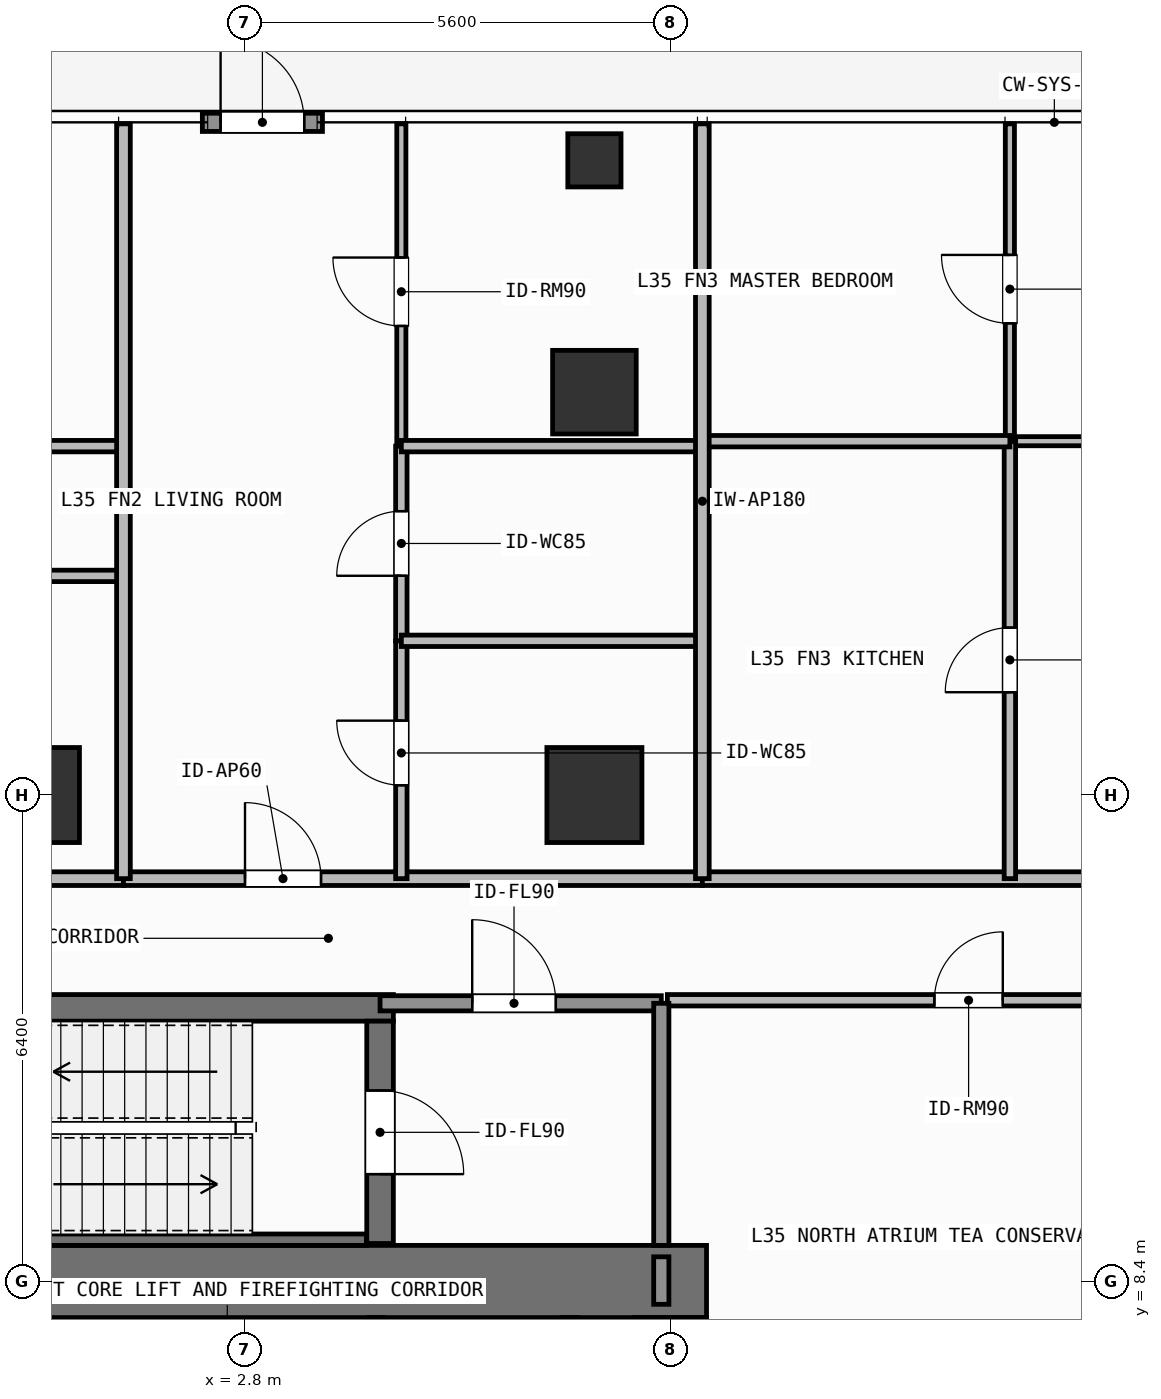
"""IFC4 building model, lengths in metres.
Left out: names, types, materials, properties, quantities, classifications, styles, units other than length and angle.
Written with IfcOpenShell. Run it as: python <this file> out.ifc"""

import sys

from ifc_helpers import new_model, si_unit, direction, frame, frame_2d, origin, origin_2d, place, context, subcontext, project, spatial, rectangle, hollow_rectangle, extrude, element, fill, save


model = new_model("IFC4")
c1 = context("Model", 3, precision=1e-05, world=origin(), true_north=direction((0.0, 1.0)))
c2 = subcontext(c1, "Body", "Model", "MODEL_VIEW")
j1 = project(units=[si_unit("LENGTHUNIT", "METRE"), si_unit("PLANEANGLEUNIT", "RADIAN")], contexts=[c1])
p1 = place(None, origin())
s1 = spatial("IfcSite", under=j1, at=p1, CompositionType="ELEMENT")
p2 = place(p1, origin())
s2 = spatial("IfcBuilding", under=s1, at=p2, CompositionType="ELEMENT")
p3 = place(p2, frame((0.0, 0.0, 140.7)))
s3 = spatial("IfcBuildingStorey", under=s2, at=p3, CompositionType="ELEMENT", Elevation=140.7)
p4 = place(p3, frame((-7.55, 8.4, 0.0), z_axis=(0.0, 0.0, 1.0), x_axis=(1.0, 0.0, 0.0)))
e1 = element("IfcWall", 1, at=p4, inside=s3, PredefinedType="SHEAR", context=c2, shape_type="SweptSolid", body=[
    extrude(rectangle(XDim=16.425, YDim=0.95, at=frame_2d((8.212, 0.0))), origin(), (0.0, 0.0, 1.0), 3.9),
])
p5 = place(p3, frame((8.4, 5.825, 0.0), z_axis=(0.0, 0.0, 1.0), x_axis=(0.0, 1.0, 0.0)))
e2 = element("IfcWall", 2, at=p5, inside=s3, PredefinedType="SHEAR", context=c2, shape_type="SweptSolid", body=[
    extrude(rectangle(XDim=2.1, YDim=0.95, at=frame_2d((1.05, 0.0))), origin(), (0.0, 0.0, 1.0), 3.9),
])
p6 = place(p3, frame((-2.555, 12.0, 0.0), z_axis=(0.0, 0.0, 1.0), x_axis=(1.0, 0.0, 0.0)))
e3 = element("IfcWall", 3, at=p6, inside=s3, PredefinedType="SHEAR", context=c2, shape_type="SweptSolid", body=[
    extrude(rectangle(XDim=7.31, YDim=0.35, at=frame_2d((3.655, 0.0))), origin(), (0.0, 0.0, 1.0), 3.9),
])
p7 = place(p3, frame((-2.2, 8.95, 0.0), z_axis=(0.0, 0.0, 1.0), x_axis=(1.0, 0.0, 0.0)))
e4 = element("IfcWall", 4, at=p7, inside=s3, PredefinedType="SHEAR", context=c2, shape_type="SweptSolid", body=[
    extrude(rectangle(XDim=6.6, YDim=0.15, at=frame_2d((3.3, 0.0))), origin(), (0.0, 0.0, 1.0), 3.9),
])
p8 = place(p3, frame((4.58, 11.825, 0.0), z_axis=(0.0, 0.0, 1.0), x_axis=(0.0, -1.0, 0.0)))
e5 = element("IfcWall", 5, at=p8, inside=s3, PredefinedType="SHEAR", context=c2, shape_type="SweptSolid", body=[
    extrude(rectangle(XDim=2.925, YDim=0.35, at=frame_2d((1.462, 0.0))), origin(), (0.0, 0.0, 1.0), 3.9),
])
p9 = place(p8, frame((0.913, 0.0, 0.0)))
e6 = element("IfcOpeningElement", 6, at=p9, cuts=e5, PredefinedType="OPENING", context=c2, shape_type="SweptSolid", body=[
    extrude(rectangle(XDim=1.1, YDim=2.15, at=frame_2d((0.55, 1.075))), frame((0.0, 0.185, 0.0), z_axis=(0.0, -1.0, 0.0), x_axis=(1.0, 0.0, 0.0)), (0.0, 0.0, 1.0), 0.37),
])
for number, where, z_axis, x_axis in (
    (7, (0.0, 14.8, 0.0), (0.0, 0.0, 1.0), (1.0, 0.0, 0.0)),
    (8, (7.4, 14.8, 0.0), (0.0, 0.0, 1.0), (1.0, 0.0, 0.0)),
):
    element("IfcColumn", number, at=place(p3, frame(where, z_axis=z_axis, x_axis=x_axis)), inside=s3, PredefinedType="COLUMN", context=c2, shape_type="SweptSolid", body=[
        extrude(rectangle(XDim=1.25, YDim=1.25, at=origin_2d()), origin(), (0.0, 0.0, 1.0), 3.9),
    ])
p10 = place(p3, frame((7.4, 20.1, 0.0), z_axis=(0.0, 0.0, 1.0), x_axis=(1.0, 0.0, 0.0)))
e9 = element("IfcColumn", 9, at=p10, inside=s3, PredefinedType="COLUMN", context=c2, shape_type="SweptSolid", body=[
    extrude(rectangle(XDim=1.1, YDim=1.1, at=origin_2d()), origin(), (0.0, 0.0, 1.0), 3.9),
])
p11 = place(p3, frame((7.4, 23.15, 0.0), z_axis=(0.0, 0.0, 1.0), x_axis=(1.0, 0.0, 0.0)))
e10 = element("IfcColumn", 10, at=p11, inside=s3, PredefinedType="COLUMN", context=c2, shape_type="SweptSolid", body=[
    extrude(hollow_rectangle(XDim=0.7, YDim=0.7, WallThickness=0.032, at=origin_2d()), origin(), (0.0, 0.0, 1.0), 3.9),
])
p12 = place(p3, frame((2.242, 23.65, 0.0), z_axis=(0.0, 0.0, 1.0), x_axis=(1.0, 0.0, 0.0)))
e11 = element("IfcWall", 11, at=p12, inside=s3, PredefinedType="SOLIDWALL", context=c2, shape_type="SweptSolid", body=[
    extrude(rectangle(XDim=1.58, YDim=0.24, at=frame_2d((0.79, 0.0))), origin(), (0.0, 0.0, 1.0), 3.68),
])
p13 = place(p12, frame((0.24, 0.0, 0.0)))
e12 = element("IfcOpeningElement", 12, at=p13, cuts=e11, PredefinedType="OPENING", context=c2, shape_type="SweptSolid", body=[
    extrude(rectangle(XDim=1.1, YDim=2.2, at=frame_2d((0.55, 1.1))), frame((0.0, 0.13, 0.0), z_axis=(0.0, -1.0, 0.0), x_axis=(1.0, 0.0, 0.0)), (0.0, 0.0, 1.0), 0.26),
])
p14 = place(p3, frame((4.525, 5.825, 0.0), z_axis=(0.0, 0.0, 1.0), x_axis=(0.0, 1.0, 0.0)))
e13 = element("IfcWall", 13, at=p14, inside=s3, PredefinedType="SHEAR", context=c2, shape_type="SweptSolid", body=[
    extrude(rectangle(XDim=2.1, YDim=0.2, at=frame_2d((1.05, 0.0))), origin(), (0.0, 0.0, 1.0), 3.68),
])
p15 = place(p14, frame((0.425, 0.0, 0.0)))
e14 = element("IfcOpeningElement", 14, at=p15, cuts=e13, PredefinedType="OPENING", context=c2, shape_type="SweptSolid", body=[
    extrude(rectangle(XDim=1.1, YDim=2.2, at=frame_2d((0.55, 1.1))), frame((0.0, 0.11, 0.0), z_axis=(0.0, -1.0, 0.0), x_axis=(1.0, 0.0, 0.0)), (0.0, 0.0, 1.0), 0.22),
])
p16 = place(p3, frame((7.075, 5.825, 0.0), z_axis=(0.0, 0.0, 1.0), x_axis=(0.0, 1.0, 0.0)))
e15 = element("IfcWall", 15, at=p16, inside=s3, PredefinedType="SHEAR", context=c2, shape_type="SweptSolid", body=[
    extrude(rectangle(XDim=2.1, YDim=0.2, at=frame_2d((1.05, 0.0))), origin(), (0.0, 0.0, 1.0), 3.68),
])
p17 = place(p3, frame((4.58, 12.06, 0.0), z_axis=(0.0, 0.0, 1.0), x_axis=(1.0, 0.0, 0.0)))
e16 = element("IfcWall", 16, at=p17, inside=s3, PredefinedType="SOLIDWALL", context=c2, shape_type="SweptSolid", body=[
    extrude(rectangle(XDim=3.7, YDim=0.2, at=frame_2d((1.85, 0.0))), origin(), (0.0, 0.0, 1.0), 3.68),
])
p18 = place(p17, frame((1.212, 0.0, 0.0)))
e17 = element("IfcOpeningElement", 17, at=p18, cuts=e16, PredefinedType="OPENING", context=c2, shape_type="SweptSolid", body=[
    extrude(rectangle(XDim=1.1, YDim=2.15, at=frame_2d((0.55, 1.075))), frame((0.0, 0.11, 0.0), z_axis=(0.0, -1.0, 0.0), x_axis=(1.0, 0.0, 0.0)), (0.0, 0.0, 1.0), 0.22),
])
p19 = place(p3, frame((8.36, 12.1, 0.0), z_axis=(0.0, 0.0, 1.0), x_axis=(1.0, 0.0, 0.0)))
e18 = element("IfcWall", 18, at=p19, inside=s3, PredefinedType="PARTITIONING", context=c2, shape_type="SweptSolid", body=[
    extrude(rectangle(XDim=7.22, YDim=0.15, at=frame_2d((3.61, 0.0))), origin(), (0.0, 0.0, 1.0), 3.68),
])
p20 = place(p19, frame((3.513, 0.0, 0.0)))
e19 = element("IfcOpeningElement", 19, at=p20, cuts=e18, PredefinedType="OPENING", context=c2, shape_type="SweptSolid", body=[
    extrude(rectangle(XDim=0.9, YDim=2.1, at=frame_2d((0.45, 1.05))), frame((0.0, 0.085, 0.0), z_axis=(0.0, -1.0, 0.0), x_axis=(1.0, 0.0, 0.0)), (0.0, 0.0, 1.0), 0.17),
])
p21 = place(p3, frame((-16.32, 13.7, 0.0), z_axis=(0.0, 0.0, 1.0), x_axis=(1.0, 0.0, 0.0)))
e20 = element("IfcWall", 20, at=p21, inside=s3, PredefinedType="PARTITIONING", context=c2, shape_type="SweptSolid", body=[
    extrude(rectangle(XDim=17.524, YDim=0.18, at=frame_2d((8.762, 0.0))), origin(), (0.0, 0.0, 1.0), 3.68),
])
p22 = place(p21, frame((7.104, 0.0, 0.0)))
e21 = element("IfcOpeningElement", 21, at=p22, cuts=e20, PredefinedType="OPENING", context=c2, shape_type="SweptSolid", body=[
    extrude(rectangle(XDim=1.0, YDim=2.2, at=frame_2d((0.5, 1.1))), frame((0.0, 0.1, 0.0), z_axis=(0.0, -1.0, 0.0), x_axis=(1.0, 0.0, 0.0)), (0.0, 0.0, 1.0), 0.2),
])
p23 = place(p3, frame((1.204, 13.7, 0.0), z_axis=(0.0, 0.0, 1.0), x_axis=(1.0, 0.0, 0.0)))
e22 = element("IfcWall", 22, at=p23, inside=s3, PredefinedType="PARTITIONING", context=c2, shape_type="SweptSolid", body=[
    extrude(rectangle(XDim=7.616, YDim=0.18, at=frame_2d((3.808, 0.0))), origin(), (0.0, 0.0, 1.0), 3.68),
])
p24 = place(p23, frame((1.599, 0.0, 0.0)))
e23 = element("IfcOpeningElement", 23, at=p24, cuts=e22, PredefinedType="OPENING", context=c2, shape_type="SweptSolid", body=[
    extrude(rectangle(XDim=1.0, YDim=2.2, at=frame_2d((0.5, 1.1))), frame((0.0, 0.1, 0.0), z_axis=(0.0, -1.0, 0.0), x_axis=(1.0, 0.0, 0.0)), (0.0, 0.0, 1.0), 0.2),
])
p25 = place(p3, frame((4.86, 13.7, 0.0), z_axis=(0.0, 0.0, 1.0), x_axis=(0.0, 1.0, 0.0)))
e24 = element("IfcWall", 24, at=p25, inside=s3, PredefinedType="PARTITIONING", context=c2, shape_type="SweptSolid", body=[
    extrude(rectangle(XDim=3.129, YDim=0.15, at=frame_2d((1.564, 0.0))), origin(), (0.0, 0.0, 1.0), 3.68),
])
p26 = place(p25, frame((1.229, 0.0, 0.0)))
e25 = element("IfcOpeningElement", 25, at=p26, cuts=e24, PredefinedType="OPENING", context=c2, shape_type="SweptSolid", body=[
    extrude(rectangle(XDim=0.85, YDim=2.1, at=frame_2d((0.425, 1.05))), frame((0.0, 0.085, 0.0), z_axis=(0.0, -1.0, 0.0), x_axis=(1.0, 0.0, 0.0)), (0.0, 0.0, 1.0), 0.17),
])
p27 = place(p3, frame((4.86, 16.829, 0.0), z_axis=(0.0, 0.0, 1.0), x_axis=(0.0, 1.0, 0.0)))
e26 = element("IfcWall", 26, at=p27, inside=s3, PredefinedType="PARTITIONING", context=c2, shape_type="SweptSolid", body=[
    extrude(rectangle(XDim=2.561, YDim=0.15, at=frame_2d((1.28, 0.0))), origin(), (0.0, 0.0, 1.0), 3.68),
])
p28 = place(p27, frame((0.855, 0.0, 0.0)))
e27 = element("IfcOpeningElement", 27, at=p28, cuts=e26, PredefinedType="OPENING", context=c2, shape_type="SweptSolid", body=[
    extrude(rectangle(XDim=0.85, YDim=2.1, at=frame_2d((0.425, 1.05))), frame((0.0, 0.085, 0.0), z_axis=(0.0, -1.0, 0.0), x_axis=(1.0, 0.0, 0.0)), (0.0, 0.0, 1.0), 0.17),
])
p29 = place(p3, frame((4.86, 19.39, 0.0), z_axis=(0.0, 0.0, 1.0), x_axis=(0.0, 1.0, 0.0)))
e28 = element("IfcWall", 28, at=p29, inside=s3, PredefinedType="PARTITIONING", context=c2, shape_type="SweptSolid", body=[
    extrude(rectangle(XDim=4.24, YDim=0.12, at=frame_2d((2.12, 0.0))), origin(), (0.0, 0.0, 1.0), 3.68),
])
p30 = place(p29, frame((1.581, 0.0, 0.0)))
e29 = element("IfcOpeningElement", 29, at=p30, cuts=e28, PredefinedType="OPENING", context=c2, shape_type="SweptSolid", body=[
    extrude(rectangle(XDim=0.9, YDim=2.1, at=frame_2d((0.45, 1.05))), frame((0.0, 0.07, 0.0), z_axis=(0.0, -1.0, 0.0), x_axis=(1.0, 0.0, 0.0)), (0.0, 0.0, 1.0), 0.14),
])
p31 = place(p3, frame((8.82, 13.7, 0.0), z_axis=(0.0, 0.0, 1.0), x_axis=(1.0, 0.0, 0.0)))
e30 = element("IfcWall", 30, at=p31, inside=s3, PredefinedType="PARTITIONING", context=c2, shape_type="SweptSolid", body=[
    extrude(rectangle(XDim=15.3, YDim=0.18, at=frame_2d((7.65, 0.0))), origin(), (0.0, 0.0, 1.0), 3.68),
])
p32 = place(p31, frame((7.688, 0.0, 0.0)))
e31 = element("IfcOpeningElement", 31, at=p32, cuts=e30, PredefinedType="OPENING", context=c2, shape_type="SweptSolid", body=[
    extrude(rectangle(XDim=1.0, YDim=2.2, at=frame_2d((0.5, 1.1))), frame((0.0, 0.1, 0.0), z_axis=(0.0, -1.0, 0.0), x_axis=(1.0, 0.0, 0.0)), (0.0, 0.0, 1.0), 0.2),
])
p33 = place(p3, frame((12.866, 19.455, 0.0), z_axis=(0.0, 0.0, 1.0), x_axis=(1.0, 0.0, 0.0)))
e32 = element("IfcWall", 32, at=p33, inside=s3, PredefinedType="PARTITIONING", context=c2, shape_type="SweptSolid", body=[
    extrude(rectangle(XDim=8.404, YDim=0.12, at=frame_2d((4.202, 0.0))), origin(), (0.0, 0.0, 1.0), 3.68),
])
p34 = place(p33, frame((3.752, 0.0, 0.0)))
e33 = element("IfcOpeningElement", 33, at=p34, cuts=e32, PredefinedType="OPENING", context=c2, shape_type="SweptSolid", body=[
    extrude(rectangle(XDim=0.9, YDim=2.1, at=frame_2d((0.45, 1.05))), frame((0.0, 0.07, 0.0), z_axis=(0.0, -1.0, 0.0), x_axis=(1.0, 0.0, 0.0)), (0.0, 0.0, 1.0), 0.14),
])
p35 = place(p3, frame((12.866, 13.7, 0.0), z_axis=(0.0, 0.0, 1.0), x_axis=(0.0, 1.0, 0.0)))
e34 = element("IfcWall", 34, at=p35, inside=s3, PredefinedType="PARTITIONING", context=c2, shape_type="SweptSolid", body=[
    extrude(rectangle(XDim=5.755, YDim=0.15, at=frame_2d((2.877, 0.0))), origin(), (0.0, 0.0, 1.0), 3.68),
])
p36 = place(p35, frame((2.452, 0.0, 0.0)))
e35 = element("IfcOpeningElement", 35, at=p36, cuts=e34, PredefinedType="OPENING", context=c2, shape_type="SweptSolid", body=[
    extrude(rectangle(XDim=0.85, YDim=2.1, at=frame_2d((0.425, 1.05))), frame((0.0, 0.085, 0.0), z_axis=(0.0, -1.0, 0.0), x_axis=(1.0, 0.0, 0.0)), (0.0, 0.0, 1.0), 0.17),
])
p37 = place(p3, frame((12.866, 19.455, 0.0), z_axis=(0.0, 0.0, 1.0), x_axis=(0.0, 1.0, 0.0)))
e36 = element("IfcWall", 36, at=p37, inside=s3, PredefinedType="PARTITIONING", context=c2, shape_type="SweptSolid", body=[
    extrude(rectangle(XDim=4.175, YDim=0.12, at=frame_2d((2.087, 0.0))), origin(), (0.0, 0.0, 1.0), 3.68),
])
p38 = place(p37, frame((1.551, 0.0, 0.0)))
e37 = element("IfcOpeningElement", 37, at=p38, cuts=e36, PredefinedType="OPENING", context=c2, shape_type="SweptSolid", body=[
    extrude(rectangle(XDim=0.9, YDim=2.1, at=frame_2d((0.45, 1.05))), frame((0.0, 0.07, 0.0), z_axis=(0.0, -1.0, 0.0), x_axis=(1.0, 0.0, 0.0)), (0.0, 0.0, 1.0), 0.14),
])
p39 = place(p3, frame((8.28, 8.875, 0.0), z_axis=(0.0, 0.0, 1.0), x_axis=(0.0, 1.0, 0.0)))
e38 = element("IfcWall", 38, at=p39, inside=s3, PredefinedType="SOLIDWALL", context=c2, shape_type="SweptSolid", body=[
    extrude(rectangle(XDim=3.185, YDim=0.2, at=frame_2d((1.593, 0.0))), origin(), (0.0, 0.0, 1.0), 3.68),
])
p40 = place(p3, frame((8.28, 8.1, 0.0), z_axis=(0.0, 0.0, 1.0), x_axis=(0.0, 1.0, 0.0)))
e39 = element("IfcWall", 39, at=p40, inside=s3, PredefinedType="SOLIDWALL", context=c2, shape_type="SweptSolid", body=[
    extrude(rectangle(XDim=0.625, YDim=0.2, at=frame_2d((0.312, 0.0))), origin(), (0.0, 0.0, 1.0), 3.68),
])
for number, where, z_axis, x_axis in (
    (40, (-4.89, 17.683, 0.0), (0.0, 0.0, 1.0), (1.0, 0.0, 0.0)),
    (41, (-4.89, 19.39, 0.0), (0.0, 0.0, 1.0), (1.0, 0.0, 0.0)),
):
    element("IfcWall", number, at=place(p3, frame(where, z_axis=z_axis, x_axis=x_axis)), inside=s3, PredefinedType="PARTITIONING", context=c2, shape_type="SweptSolid", body=[
        extrude(rectangle(XDim=6.094, YDim=0.15, at=frame_2d((3.047, 0.0))), origin(), (0.0, 0.0, 1.0), 3.68),
    ])
for number, where, z_axis, x_axis in (
    (42, (4.86, 16.829, 0.0), (0.0, 0.0, 1.0), (1.0, 0.0, 0.0)),
    (43, (4.86, 19.39, 0.0), (0.0, 0.0, 1.0), (1.0, 0.0, 0.0)),
):
    element("IfcWall", number, at=place(p3, frame(where, z_axis=z_axis, x_axis=x_axis)), inside=s3, PredefinedType="PARTITIONING", context=c2, shape_type="SweptSolid", body=[
        extrude(rectangle(XDim=3.96, YDim=0.15, at=frame_2d((1.98, 0.0))), origin(), (0.0, 0.0, 1.0), 3.68),
    ])
p41 = place(p3, frame((1.204, 13.7, 0.0), z_axis=(0.0, 0.0, 1.0), x_axis=(0.0, 1.0, 0.0)))
e44 = element("IfcWall", 44, at=p41, inside=s3, PredefinedType="PARTITIONING", context=c2, shape_type="SweptSolid", body=[
    extrude(rectangle(XDim=9.93, YDim=0.18, at=frame_2d((4.965, 0.0))), origin(), (0.0, 0.0, 1.0), 3.68),
])
p42 = place(p3, frame((8.82, 19.455, 0.0), z_axis=(0.0, 0.0, 1.0), x_axis=(1.0, 0.0, 0.0)))
e45 = element("IfcWall", 45, at=p42, inside=s3, PredefinedType="PARTITIONING", context=c2, shape_type="SweptSolid", body=[
    extrude(rectangle(XDim=4.046, YDim=0.15, at=frame_2d((2.023, 0.0))), origin(), (0.0, 0.0, 1.0), 3.68),
])
p43 = place(p3, frame((8.82, 13.7, 0.0), z_axis=(0.0, 0.0, 1.0), x_axis=(0.0, 1.0, 0.0)))
e46 = element("IfcWall", 46, at=p43, inside=s3, PredefinedType="PARTITIONING", context=c2, shape_type="SweptSolid", body=[
    extrude(rectangle(XDim=9.93, YDim=0.18, at=frame_2d((4.965, 0.0))), origin(), (0.0, 0.0, 1.0), 3.68),
])
p44 = place(p13, origin())
e47 = element("IfcDoor", 47, at=p44, inside=s3, OperationType="SINGLE_SWING_LEFT", PredefinedType="DOOR", context=c2, shape_type="SweptSolid", body=[
    extrude(rectangle(XDim=1.1, YDim=2.2, at=frame_2d((0.55, 1.1))), frame((0.0, 0.025, 0.0), z_axis=(0.0, -1.0, 0.0), x_axis=(1.0, 0.0, 0.0)), (0.0, 0.0, 1.0), 0.05),
])
fill(e12, e47)
p45 = place(p9, origin())
e48 = element("IfcDoor", 48, at=p45, inside=s3, OperationType="SINGLE_SWING_RIGHT", PredefinedType="DOOR", context=c2, shape_type="SweptSolid", body=[
    extrude(rectangle(XDim=1.1, YDim=2.15, at=frame_2d((0.55, 1.075))), frame((0.0, 0.025, 0.0), z_axis=(0.0, -1.0, 0.0), x_axis=(1.0, 0.0, 0.0)), (0.0, 0.0, 1.0), 0.05),
])
fill(e6, e48)
p46 = place(p18, origin())
e49 = element("IfcDoor", 49, at=p46, inside=s3, OperationType="SINGLE_SWING_LEFT", PredefinedType="DOOR", context=c2, shape_type="SweptSolid", body=[
    extrude(rectangle(XDim=1.1, YDim=2.15, at=frame_2d((0.55, 1.075))), frame((0.0, 0.025, 0.0), z_axis=(0.0, -1.0, 0.0), x_axis=(1.0, 0.0, 0.0)), (0.0, 0.0, 1.0), 0.05),
])
fill(e17, e49)
p47 = place(p20, origin())
e50 = element("IfcDoor", 50, at=p47, inside=s3, OperationType="SINGLE_SWING_RIGHT", PredefinedType="DOOR", context=c2, shape_type="SweptSolid", body=[
    extrude(rectangle(XDim=0.9, YDim=2.1, at=frame_2d((0.45, 1.05))), frame((0.0, 0.025, 0.0), z_axis=(0.0, -1.0, 0.0), x_axis=(1.0, 0.0, 0.0)), (0.0, 0.0, 1.0), 0.05),
])
fill(e19, e50)
p48 = place(p24, origin())
e51 = element("IfcDoor", 51, at=p48, inside=s3, OperationType="SINGLE_SWING_LEFT", PredefinedType="DOOR", context=c2, shape_type="SweptSolid", body=[
    extrude(rectangle(XDim=1.0, YDim=2.2, at=frame_2d((0.5, 1.1))), frame((0.0, 0.025, 0.0), z_axis=(0.0, -1.0, 0.0), x_axis=(1.0, 0.0, 0.0)), (0.0, 0.0, 1.0), 0.05),
])
fill(e23, e51)
p49 = place(p26, origin())
e52 = element("IfcDoor", 52, at=p49, inside=s3, OperationType="SINGLE_SWING_RIGHT", PredefinedType="DOOR", context=c2, shape_type="SweptSolid", body=[
    extrude(rectangle(XDim=0.85, YDim=2.1, at=frame_2d((0.425, 1.05))), frame((0.0, 0.025, 0.0), z_axis=(0.0, -1.0, 0.0), x_axis=(1.0, 0.0, 0.0)), (0.0, 0.0, 1.0), 0.05),
])
fill(e25, e52)
p50 = place(p28, origin())
e53 = element("IfcDoor", 53, at=p50, inside=s3, OperationType="SINGLE_SWING_LEFT", PredefinedType="DOOR", context=c2, shape_type="SweptSolid", body=[
    extrude(rectangle(XDim=0.85, YDim=2.1, at=frame_2d((0.425, 1.05))), frame((0.0, 0.025, 0.0), z_axis=(0.0, -1.0, 0.0), x_axis=(1.0, 0.0, 0.0)), (0.0, 0.0, 1.0), 0.05),
])
fill(e27, e53)
p51 = place(p30, origin())
e54 = element("IfcDoor", 54, at=p51, inside=s3, OperationType="SINGLE_SWING_RIGHT", PredefinedType="DOOR", context=c2, shape_type="SweptSolid", body=[
    extrude(rectangle(XDim=0.9, YDim=2.1, at=frame_2d((0.45, 1.05))), frame((0.0, 0.025, 0.0), z_axis=(0.0, -1.0, 0.0), x_axis=(1.0, 0.0, 0.0)), (0.0, 0.0, 1.0), 0.05),
])
fill(e29, e54)
p52 = place(p36, origin())
e55 = element("IfcDoor", 55, at=p52, inside=s3, OperationType="SINGLE_SWING_LEFT", PredefinedType="DOOR", context=c2, shape_type="SweptSolid", body=[
    extrude(rectangle(XDim=0.85, YDim=2.1, at=frame_2d((0.425, 1.05))), frame((0.0, 0.025, 0.0), z_axis=(0.0, -1.0, 0.0), x_axis=(1.0, 0.0, 0.0)), (0.0, 0.0, 1.0), 0.05),
])
fill(e35, e55)
p53 = place(p38, origin())
e56 = element("IfcDoor", 56, at=p53, inside=s3, OperationType="SINGLE_SWING_RIGHT", PredefinedType="DOOR", context=c2, shape_type="SweptSolid", body=[
    extrude(rectangle(XDim=0.9, YDim=2.1, at=frame_2d((0.45, 1.05))), frame((0.0, 0.025, 0.0), z_axis=(0.0, -1.0, 0.0), x_axis=(1.0, 0.0, 0.0)), (0.0, 0.0, 1.0), 0.05),
])
fill(e37, e56)
save(model, sys.argv[1])
